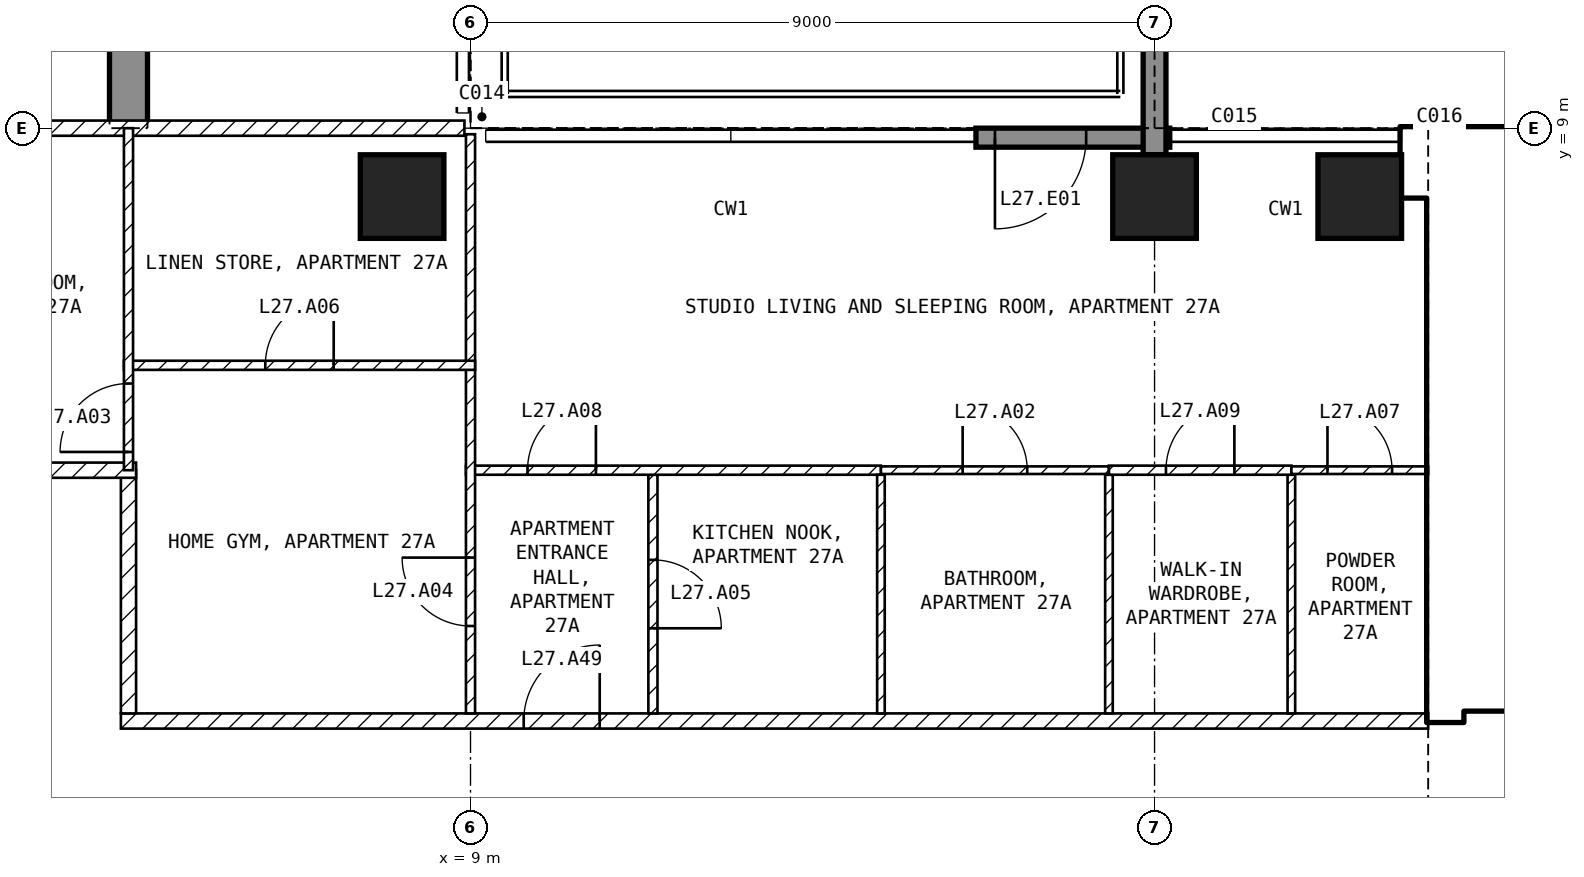
"""IFC4 building model, lengths in metres.
Left out: names, types, materials, properties, quantities, classifications, styles, units other than length and angle.
Written with IfcOpenShell. Run it as: python <this file> out.ifc"""

import sys

from ifc_helpers import new_model, si_unit, direction, frame, frame_2d, origin, origin_2d, place, context, subcontext, project, spatial, polyline, rectangle, outline, extrude, element, fill, save


model = new_model("IFC4")
c1 = context("Model", 3, precision=1e-05, world=origin(), true_north=direction((0.0, 1.0)))
c2 = subcontext(c1, "Body", "Model", "MODEL_VIEW")
j1 = project(units=[si_unit("LENGTHUNIT", "METRE"), si_unit("PLANEANGLEUNIT", "RADIAN")], contexts=[c1])
p1 = place(None, origin())
s1 = spatial("IfcSite", under=j1, at=p1, CompositionType="ELEMENT")
p2 = place(p1, origin())
s2 = spatial("IfcBuilding", under=s1, at=p2, CompositionType="ELEMENT")
p3 = place(p2, frame((0.0, 0.0, 116.4)))
s3 = spatial("IfcBuildingStorey", under=s2, at=p3, CompositionType="ELEMENT", Elevation=116.4)
for number, where, z_axis, x_axis in (
    (1, (8.1, 8.1, -0.25), (0.0, 0.0, 1.0), (1.0, 0.0, 0.0)),
    (2, (18.0, 8.1, -0.25), (0.0, 0.0, 1.0), (1.0, 0.0, 0.0)),
    (3, (20.7, 8.1, -0.25), (0.0, 0.0, 1.0), (1.0, 0.0, 0.0)),
):
    element("IfcColumn", number, at=place(p3, frame(where, z_axis=z_axis, x_axis=x_axis)), inside=s3, PredefinedType="COLUMN", context=c2, shape_type="SweptSolid", body=[
        extrude(rectangle(XDim=1.1, YDim=1.1, at=origin_2d()), origin(), (0.0, 0.0, 1.0), 3.5),
    ])
p4 = place(p3, frame((4.25, 9.0, -0.25), z_axis=(1.0, 0.0, 0.0), x_axis=(0.0, 1.0, 0.0)))
e4 = element("IfcWall", 4, at=p4, inside=s3, PredefinedType="SHEAR", context=c2, shape_type="SweptSolid", body=[
    extrude(outline(polyline([(0.0, 0.0), (2.1, 0.0), (2.1, 2.65), (4.5, 2.65), (4.5, 0.0), (9.9, 0.0), (9.9, 2.65), (12.3, 2.65), (12.3, 0.0), (16.55, 0.0), (16.55, 3.5), (0.0, 3.5), (0.0, 0.0)])), origin(), (0.0, 0.0, 1.0), 0.5),
])
p5 = place(p3, frame((18.2, 8.875, 0.0), z_axis=(0.0, 0.0, 1.0), x_axis=(-1.0, 0.0, 0.0)))
e5 = element("IfcWall", 5, at=p5, inside=s3, PredefinedType="SOLIDWALL", context=c2, shape_type="SweptSolid", body=[
    extrude(rectangle(XDim=2.55, YDim=0.25, at=frame_2d((1.275, 0.0))), origin(), (0.0, 0.0, 1.0), 3.25),
])
p6 = place(p5, frame((1.1, 0.0, 0.0)))
e6 = element("IfcOpeningElement", 6, at=p6, cuts=e5, PredefinedType="OPENING", context=c2, shape_type="SweptSolid", body=[
    extrude(rectangle(XDim=1.2, YDim=2.4, at=frame_2d((0.6, 1.2))), frame((0.0, 0.135, 0.0), z_axis=(0.0, -1.0, 0.0), x_axis=(1.0, 0.0, 0.0)), (0.0, 0.0, 1.0), 0.27),
])
p7 = place(p3, frame((18.0, 8.65, 0.0), z_axis=(0.0, 0.0, 1.0), x_axis=(0.0, 1.0, 0.0)))
e7 = element("IfcWall", 7, at=p7, inside=s3, PredefinedType="SOLIDWALL", context=c2, shape_type="SweptSolid", body=[
    extrude(rectangle(XDim=3.09, YDim=0.3, at=frame_2d((1.545, 0.0))), origin(), (0.0, 0.0, 1.0), 3.25),
])
p8 = place(p3, frame((21.25, 8.55, 0.0), z_axis=(0.0, 0.0, 1.0), x_axis=(1.0, 0.0, 0.0)))
e8 = element("IfcWall", 8, at=p8, inside=s3, PredefinedType="SHEAR", context=c2, shape_type="SweptSolid", body=[
    extrude(rectangle(XDim=8.2, YDim=0.9, at=frame_2d((4.1, 0.0))), origin(), (0.0, 0.0, 1.0), 3.25),
])
p9 = place(p3, frame((21.825, 1.2, 0.0), z_axis=(0.0, 0.0, 1.0), x_axis=(0.0, 1.0, 0.0)))
e9 = element("IfcWall", 9, at=p9, inside=s3, PredefinedType="SHEAR", context=c2, shape_type="SweptSolid", body=[
    extrude(rectangle(XDim=6.9, YDim=0.45, at=frame_2d((3.45, 0.0))), origin(), (0.0, 0.0, 1.0), 3.25),
])
p10 = place(p3, frame((22.05, 1.45, 0.0), z_axis=(0.0, 0.0, 1.0), x_axis=(1.0, 0.0, 0.0)))
e10 = element("IfcWall", 10, at=p10, inside=s3, PredefinedType="SOLIDWALL", context=c2, shape_type="SweptSolid", body=[
    extrude(rectangle(XDim=11.0, YDim=0.2, at=frame_2d((5.5, 0.0))), origin(), (0.0, 0.0, 1.0), 3.25),
])
p11 = place(p10, frame((0.75, 0.0, 0.0)))
e11 = element("IfcOpeningElement", 11, at=p11, cuts=e10, PredefinedType="OPENING", context=c2, shape_type="SweptSolid", body=[
    extrude(rectangle(XDim=1.0, YDim=2.1, at=frame_2d((0.5, 1.05))), frame((0.0, 0.11, 0.0), z_axis=(0.0, -1.0, 0.0), x_axis=(1.0, 0.0, 0.0)), (0.0, 0.0, 1.0), 0.22),
])
p12 = place(p10, frame((3.25, 0.0, 0.0)))
e12 = element("IfcOpeningElement", 12, at=p12, cuts=e10, PredefinedType="OPENING", context=c2, shape_type="SweptSolid", body=[
    extrude(rectangle(XDim=1.0, YDim=2.1, at=frame_2d((0.5, 1.05))), frame((0.0, 0.11, 0.0), z_axis=(0.0, -1.0, 0.0), x_axis=(1.0, 0.0, 0.0)), (0.0, 0.0, 1.0), 0.22),
])
p13 = place(p10, frame((9.075, 0.0, 0.0)))
e13 = element("IfcOpeningElement", 13, at=p13, cuts=e10, PredefinedType="OPENING", context=c2, shape_type="SweptSolid", body=[
    extrude(rectangle(XDim=0.9, YDim=2.1, at=frame_2d((0.45, 1.05))), frame((0.0, 0.11, 0.0), z_axis=(0.0, -1.0, 0.0), x_axis=(1.0, 0.0, 0.0)), (0.0, 0.0, 1.0), 0.22),
])
p14 = place(p3, frame((22.05, 5.15, 0.0), z_axis=(0.0, 0.0, 1.0), x_axis=(1.0, 0.0, 0.0)))
e14 = element("IfcWall", 14, at=p14, inside=s3, PredefinedType="SOLIDWALL", context=c2, shape_type="SweptSolid", body=[
    extrude(rectangle(XDim=6.3, YDim=0.2, at=frame_2d((3.15, 0.0))), origin(), (0.0, 0.0, 1.0), 3.25),
])
p15 = place(p14, frame((0.2, 0.0, 0.0)))
e15 = element("IfcOpeningElement", 15, at=p15, cuts=e14, PredefinedType="OPENING", context=c2, shape_type="SweptSolid", body=[
    extrude(rectangle(XDim=1.0, YDim=2.1, at=frame_2d((0.5, 1.05))), frame((0.0, 0.11, 0.0), z_axis=(0.0, -1.0, 0.0), x_axis=(1.0, 0.0, 0.0)), (0.0, 0.0, 1.0), 0.22),
])
p16 = place(p3, frame((4.4, 1.2, 0.0), z_axis=(0.0, 0.0, 1.0), x_axis=(1.0, 0.0, 0.0)))
e16 = element("IfcWall", 16, at=p16, inside=s3, PredefinedType="PARTITIONING", context=c2, shape_type="SweptSolid", body=[
    extrude(rectangle(XDim=17.2, YDim=0.2, at=frame_2d((8.6, 0.0))), origin(), (0.0, 0.0, 1.0), 3.25),
])
p17 = place(p16, frame((5.3, 0.0, 0.0)))
e17 = element("IfcOpeningElement", 17, at=p17, cuts=e16, PredefinedType="OPENING", context=c2, shape_type="SweptSolid", body=[
    extrude(rectangle(XDim=1.0, YDim=2.1, at=frame_2d((0.5, 1.05))), frame((0.0, 0.11, 0.0), z_axis=(0.0, -1.0, 0.0), x_axis=(1.0, 0.0, 0.0)), (0.0, 0.0, 1.0), 0.22),
])
p18 = place(p3, frame((4.5, 4.5, 0.0), z_axis=(0.0, 0.0, 1.0), x_axis=(0.0, -1.0, 0.0)))
e18 = element("IfcWall", 18, at=p18, inside=s3, PredefinedType="PARTITIONING", context=c2, shape_type="SweptSolid", body=[
    extrude(rectangle(XDim=3.2, YDim=0.2, at=frame_2d((1.6, 0.0))), origin(), (0.0, 0.0, 1.0), 3.25),
])
p19 = place(p3, frame((1.1, 4.5, 0.0), z_axis=(0.0, 0.0, 1.0), x_axis=(1.0, 0.0, 0.0)))
e19 = element("IfcWall", 19, at=p19, inside=s3, PredefinedType="PARTITIONING", context=c2, shape_type="SweptSolid", body=[
    extrude(rectangle(XDim=3.5, YDim=0.2, at=frame_2d((1.75, 0.0))), origin(), (0.0, 0.0, 1.0), 3.25),
])
p20 = place(p3, frame((-8.92, 9.0, 0.0), z_axis=(0.0, 0.0, 1.0), x_axis=(1.0, 0.0, 0.0)))
e20 = element("IfcWall", 20, at=p20, inside=s3, PredefinedType="PARTITIONING", context=c2, shape_type="SweptSolid", body=[
    extrude(rectangle(XDim=17.84, YDim=0.2, at=frame_2d((8.92, 0.0))), origin(), (0.0, 0.0, 1.0), 3.25),
])
p21 = place(p20, frame((8.42, 0.0, 0.0)))
e21 = element("IfcOpeningElement", 21, at=p21, cuts=e20, PredefinedType="OPENING", context=c2, shape_type="SweptSolid", body=[
    extrude(rectangle(XDim=1.0, YDim=2.1, at=frame_2d((0.5, 1.05))), frame((0.0, 0.11, 0.0), z_axis=(0.0, -1.0, 0.0), x_axis=(1.0, 0.0, 0.0)), (0.0, 0.0, 1.0), 0.22),
])
p22 = place(p3, frame((11.4, 4.44, 0.0), z_axis=(0.0, 0.0, 1.0), x_axis=(0.0, -1.0, 0.0)))
e22 = element("IfcWall", 22, at=p22, inside=s3, PredefinedType="PARTITIONING", context=c2, shape_type="SweptSolid", body=[
    extrude(rectangle(XDim=3.14, YDim=0.12, at=frame_2d((1.57, 0.0))), origin(), (0.0, 0.0, 1.0), 3.25),
])
p23 = place(p22, frame((1.12, 0.0, 0.0)))
e23 = element("IfcOpeningElement", 23, at=p23, cuts=e22, PredefinedType="OPENING", context=c2, shape_type="SweptSolid", body=[
    extrude(rectangle(XDim=0.9, YDim=2.1, at=frame_2d((0.45, 1.05))), frame((0.0, 0.07, 0.0), z_axis=(0.0, -1.0, 0.0), x_axis=(1.0, 0.0, 0.0)), (0.0, 0.0, 1.0), 0.14),
])
p24 = place(p3, frame((8.94, 4.5, 0.0), z_axis=(0.0, 0.0, 1.0), x_axis=(1.0, 0.0, 0.0)))
e24 = element("IfcWall", 24, at=p24, inside=s3, PredefinedType="PARTITIONING", context=c2, shape_type="SweptSolid", body=[
    extrude(rectangle(XDim=5.46, YDim=0.12, at=frame_2d((2.73, 0.0))), origin(), (0.0, 0.0, 1.0), 3.25),
])
p25 = place(p24, frame((0.81, 0.0, 0.0)))
e25 = element("IfcOpeningElement", 25, at=p25, cuts=e24, PredefinedType="OPENING", context=c2, shape_type="SweptSolid", body=[
    extrude(rectangle(XDim=0.9, YDim=2.1, at=frame_2d((0.45, 1.05))), frame((0.0, 0.07, 0.0), z_axis=(0.0, -1.0, 0.0), x_axis=(1.0, 0.0, 0.0)), (0.0, 0.0, 1.0), 0.14),
])
p26 = place(p3, frame((9.0, 1.3, 0.0), z_axis=(0.0, 0.0, 1.0), x_axis=(0.0, 1.0, 0.0)))
e26 = element("IfcWall", 26, at=p26, inside=s3, PredefinedType="PARTITIONING", context=c2, shape_type="SweptSolid", body=[
    extrude(rectangle(XDim=7.62, YDim=0.12, at=frame_2d((3.81, 0.0))), origin(), (0.0, 0.0, 1.0), 3.25),
])
p27 = place(p26, frame((1.15, 0.0, 0.0)))
e27 = element("IfcOpeningElement", 27, at=p27, cuts=e26, PredefinedType="OPENING", context=c2, shape_type="SweptSolid", body=[
    extrude(rectangle(XDim=0.9, YDim=2.1, at=frame_2d((0.45, 1.05))), frame((0.0, 0.07, 0.0), z_axis=(0.0, -1.0, 0.0), x_axis=(1.0, 0.0, 0.0)), (0.0, 0.0, 1.0), 0.14),
])
for number, where, z_axis, x_axis in (
    (28, (14.4, 4.44, 0.0), (0.0, 0.0, 1.0), (0.0, -1.0, 0.0)),
    (29, (17.4, 4.44, 0.0), (0.0, 0.0, 1.0), (0.0, -1.0, 0.0)),
):
    element("IfcWall", number, at=place(p3, frame(where, z_axis=z_axis, x_axis=x_axis)), inside=s3, PredefinedType="PARTITIONING", context=c2, shape_type="SweptSolid", body=[
        extrude(rectangle(XDim=3.14, YDim=0.1, at=frame_2d((1.57, 0.0))), origin(), (0.0, 0.0, 1.0), 3.25),
    ])
p28 = place(p3, frame((14.4, 4.5, 0.0), z_axis=(0.0, 0.0, 1.0), x_axis=(1.0, 0.0, 0.0)))
e30 = element("IfcWall", 30, at=p28, inside=s3, PredefinedType="PARTITIONING", context=c2, shape_type="SweptSolid", body=[
    extrude(rectangle(XDim=3.0, YDim=0.1, at=frame_2d((1.5, 0.0))), origin(), (0.0, 0.0, 1.0), 3.25),
])
p29 = place(p28, frame((1.075, 0.0, 0.0)))
e31 = element("IfcOpeningElement", 31, at=p29, cuts=e30, PredefinedType="OPENING", context=c2, shape_type="SweptSolid", body=[
    extrude(rectangle(XDim=0.85, YDim=2.1, at=frame_2d((0.425, 1.05))), frame((0.0, 0.06, 0.0), z_axis=(0.0, -1.0, 0.0), x_axis=(1.0, 0.0, 0.0)), (0.0, 0.0, 1.0), 0.12),
])
p30 = place(p3, frame((19.8, 4.44, 0.0), z_axis=(0.0, 0.0, 1.0), x_axis=(0.0, -1.0, 0.0)))
e32 = element("IfcWall", 32, at=p30, inside=s3, PredefinedType="PARTITIONING", context=c2, shape_type="SweptSolid", body=[
    extrude(rectangle(XDim=3.14, YDim=0.1, at=frame_2d((1.57, 0.0))), origin(), (0.0, 0.0, 1.0), 3.25),
])
p31 = place(p3, frame((17.4, 4.5, 0.0), z_axis=(0.0, 0.0, 1.0), x_axis=(1.0, 0.0, 0.0)))
e33 = element("IfcWall", 33, at=p31, inside=s3, PredefinedType="PARTITIONING", context=c2, shape_type="SweptSolid", body=[
    extrude(rectangle(XDim=2.4, YDim=0.12, at=frame_2d((1.2, 0.0))), origin(), (0.0, 0.0, 1.0), 3.25),
])
p32 = place(p31, frame((0.75, 0.0, 0.0)))
e34 = element("IfcOpeningElement", 34, at=p32, cuts=e33, PredefinedType="OPENING", context=c2, shape_type="SweptSolid", body=[
    extrude(rectangle(XDim=0.9, YDim=2.1, at=frame_2d((0.45, 1.05))), frame((0.0, 0.07, 0.0), z_axis=(0.0, -1.0, 0.0), x_axis=(1.0, 0.0, 0.0)), (0.0, 0.0, 1.0), 0.14),
])
p33 = place(p3, frame((19.8, 4.5, 0.0), z_axis=(0.0, 0.0, 1.0), x_axis=(1.0, 0.0, 0.0)))
e35 = element("IfcWall", 35, at=p33, inside=s3, PredefinedType="PARTITIONING", context=c2, shape_type="SweptSolid", body=[
    extrude(rectangle(XDim=1.8, YDim=0.1, at=frame_2d((0.9, 0.0))), origin(), (0.0, 0.0, 1.0), 3.25),
])
p34 = place(p33, frame((0.475, 0.0, 0.0)))
e36 = element("IfcOpeningElement", 36, at=p34, cuts=e35, PredefinedType="OPENING", context=c2, shape_type="SweptSolid", body=[
    extrude(rectangle(XDim=0.85, YDim=2.1, at=frame_2d((0.425, 1.05))), frame((0.0, 0.06, 0.0), z_axis=(0.0, -1.0, 0.0), x_axis=(1.0, 0.0, 0.0)), (0.0, 0.0, 1.0), 0.12),
])
p35 = place(p3, frame((4.44, 5.88, 0.0), z_axis=(0.0, 0.0, 1.0), x_axis=(1.0, 0.0, 0.0)))
e37 = element("IfcWall", 37, at=p35, inside=s3, PredefinedType="PARTITIONING", context=c2, shape_type="SweptSolid", body=[
    extrude(rectangle(XDim=4.62, YDim=0.12, at=frame_2d((2.31, 0.0))), origin(), (0.0, 0.0, 1.0), 3.25),
])
p36 = place(p35, frame((1.86, 0.0, 0.0)))
e38 = element("IfcOpeningElement", 38, at=p36, cuts=e37, PredefinedType="OPENING", context=c2, shape_type="SweptSolid", body=[
    extrude(rectangle(XDim=0.9, YDim=2.1, at=frame_2d((0.45, 1.05))), frame((0.0, 0.07, 0.0), z_axis=(0.0, -1.0, 0.0), x_axis=(1.0, 0.0, 0.0)), (0.0, 0.0, 1.0), 0.14),
])
p37 = place(p3, frame((4.5, 4.5, 0.0), z_axis=(0.0, 0.0, 1.0), x_axis=(0.0, 1.0, 0.0)))
e39 = element("IfcWall", 39, at=p37, inside=s3, PredefinedType="PARTITIONING", context=c2, shape_type="SweptSolid", body=[
    extrude(rectangle(XDim=4.5, YDim=0.12, at=frame_2d((2.25, 0.0))), origin(), (0.0, 0.0, 1.0), 3.25),
])
p38 = place(p37, frame((0.24, 0.0, 0.0)))
e40 = element("IfcOpeningElement", 40, at=p38, cuts=e39, PredefinedType="OPENING", context=c2, shape_type="SweptSolid", body=[
    extrude(rectangle(XDim=0.9, YDim=2.1, at=frame_2d((0.45, 1.05))), frame((0.0, 0.07, 0.0), z_axis=(0.0, -1.0, 0.0), x_axis=(1.0, 0.0, 0.0)), (0.0, 0.0, 1.0), 0.14),
])
p39 = place(p6, origin())
e41 = element("IfcDoor", 41, at=p39, inside=s3, OperationType="SINGLE_SWING_RIGHT", PredefinedType="DOOR", context=c2, shape_type="SweptSolid", body=[
    extrude(rectangle(XDim=1.2, YDim=2.4, at=frame_2d((0.6, 1.2))), frame((0.0, 0.025, 0.0), z_axis=(0.0, -1.0, 0.0), x_axis=(1.0, 0.0, 0.0)), (0.0, 0.0, 1.0), 0.05),
])
fill(e6, e41)
p40 = place(p15, origin())
e42 = element("IfcDoor", 42, at=p40, inside=s3, OperationType="SINGLE_SWING_LEFT", PredefinedType="DOOR", context=c2, shape_type="SweptSolid", body=[
    extrude(rectangle(XDim=1.0, YDim=2.1, at=frame_2d((0.5, 1.05))), frame((0.0, 0.025, 0.0), z_axis=(0.0, -1.0, 0.0), x_axis=(1.0, 0.0, 0.0)), (0.0, 0.0, 1.0), 0.05),
])
fill(e15, e42)
p41 = place(p29, origin())
e43 = element("IfcDoor", 43, at=p41, inside=s3, OperationType="SINGLE_SWING_LEFT", PredefinedType="DOOR", context=c2, shape_type="SweptSolid", body=[
    extrude(rectangle(XDim=0.85, YDim=2.1, at=frame_2d((0.425, 1.05))), frame((0.0, 0.025, 0.0), z_axis=(0.0, -1.0, 0.0), x_axis=(1.0, 0.0, 0.0)), (0.0, 0.0, 1.0), 0.05),
])
fill(e31, e43)
p42 = place(p38, origin())
e44 = element("IfcDoor", 44, at=p42, inside=s3, OperationType="SINGLE_SWING_LEFT", PredefinedType="DOOR", context=c2, shape_type="SweptSolid", body=[
    extrude(rectangle(XDim=0.9, YDim=2.1, at=frame_2d((0.45, 1.05))), frame((0.0, 0.025, 0.0), z_axis=(0.0, -1.0, 0.0), x_axis=(1.0, 0.0, 0.0)), (0.0, 0.0, 1.0), 0.05),
])
fill(e40, e44)
p43 = place(p27, origin())
e45 = element("IfcDoor", 45, at=p43, inside=s3, OperationType="SINGLE_SWING_RIGHT", PredefinedType="DOOR", context=c2, shape_type="SweptSolid", body=[
    extrude(rectangle(XDim=0.9, YDim=2.1, at=frame_2d((0.45, 1.05))), frame((0.0, 0.025, 0.0), z_axis=(0.0, -1.0, 0.0), x_axis=(1.0, 0.0, 0.0)), (0.0, 0.0, 1.0), 0.05),
])
fill(e27, e45)
p44 = place(p23, origin())
e46 = element("IfcDoor", 46, at=p44, inside=s3, OperationType="SINGLE_SWING_RIGHT", PredefinedType="DOOR", context=c2, shape_type="SweptSolid", body=[
    extrude(rectangle(XDim=0.9, YDim=2.1, at=frame_2d((0.45, 1.05))), frame((0.0, 0.025, 0.0), z_axis=(0.0, -1.0, 0.0), x_axis=(1.0, 0.0, 0.0)), (0.0, 0.0, 1.0), 0.05),
])
fill(e23, e46)
p45 = place(p36, origin())
e47 = element("IfcDoor", 47, at=p45, inside=s3, OperationType="SINGLE_SWING_RIGHT", PredefinedType="DOOR", context=c2, shape_type="SweptSolid", body=[
    extrude(rectangle(XDim=0.9, YDim=2.1, at=frame_2d((0.45, 1.05))), frame((0.0, 0.025, 0.0), z_axis=(0.0, -1.0, 0.0), x_axis=(1.0, 0.0, 0.0)), (0.0, 0.0, 1.0), 0.05),
])
fill(e38, e47)
p46 = place(p34, origin())
e48 = element("IfcDoor", 48, at=p46, inside=s3, OperationType="SINGLE_SWING_LEFT", PredefinedType="DOOR", context=c2, shape_type="SweptSolid", body=[
    extrude(rectangle(XDim=0.85, YDim=2.1, at=frame_2d((0.425, 1.05))), frame((0.0, 0.025, 0.0), z_axis=(0.0, -1.0, 0.0), x_axis=(1.0, 0.0, 0.0)), (0.0, 0.0, 1.0), 0.05),
])
fill(e36, e48)
p47 = place(p25, origin())
e49 = element("IfcDoor", 49, at=p47, inside=s3, OperationType="SINGLE_SWING_RIGHT", PredefinedType="DOOR", context=c2, shape_type="SweptSolid", body=[
    extrude(rectangle(XDim=0.9, YDim=2.1, at=frame_2d((0.45, 1.05))), frame((0.0, 0.025, 0.0), z_axis=(0.0, -1.0, 0.0), x_axis=(1.0, 0.0, 0.0)), (0.0, 0.0, 1.0), 0.05),
])
fill(e25, e49)
p48 = place(p32, origin())
e50 = element("IfcDoor", 50, at=p48, inside=s3, OperationType="SINGLE_SWING_RIGHT", PredefinedType="DOOR", context=c2, shape_type="SweptSolid", body=[
    extrude(rectangle(XDim=0.9, YDim=2.1, at=frame_2d((0.45, 1.05))), frame((0.0, 0.025, 0.0), z_axis=(0.0, -1.0, 0.0), x_axis=(1.0, 0.0, 0.0)), (0.0, 0.0, 1.0), 0.05),
])
fill(e34, e50)
p49 = place(p17, origin())
e51 = element("IfcDoor", 51, at=p49, inside=s3, OperationType="SINGLE_SWING_RIGHT", PredefinedType="DOOR", context=c2, shape_type="SweptSolid", body=[
    extrude(rectangle(XDim=1.0, YDim=2.1, at=frame_2d((0.5, 1.05))), frame((0.0, 0.025, 0.0), z_axis=(0.0, -1.0, 0.0), x_axis=(1.0, 0.0, 0.0)), (0.0, 0.0, 1.0), 0.05),
])
fill(e17, e51)
save(model, sys.argv[1])
